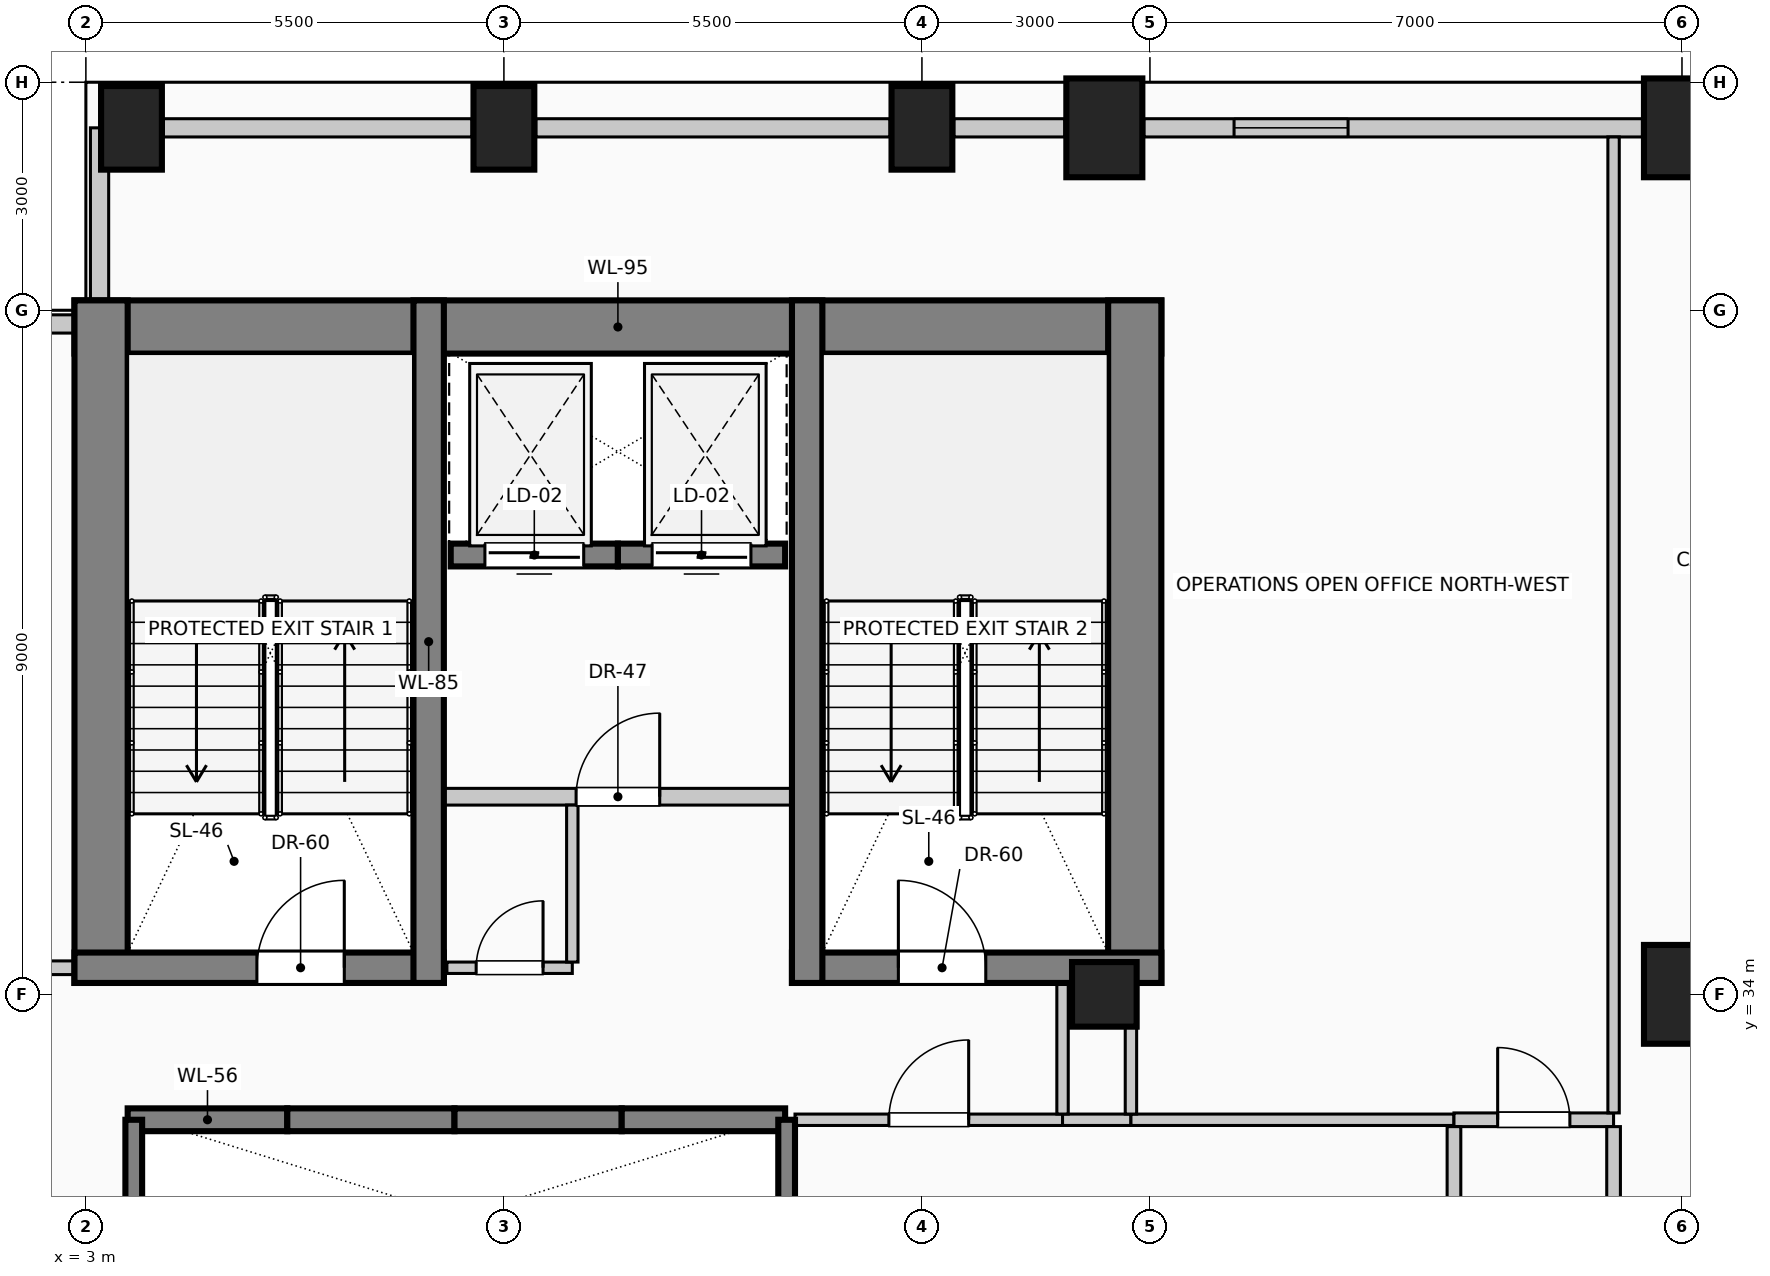
"""IFC4 building model, lengths in metres.
Left out: names, types, materials, properties, quantities, classifications, styles, units other than length and angle.
Written with IfcOpenShell. Run it as: python <this file> out.ifc"""

import sys

from ifc_helpers import new_model, si_unit, direction, frame, frame_2d, origin, origin_2d, place, context, subcontext, project, spatial, rectangle, circle, extrude, element, fill, save


model = new_model("IFC4")
c1 = context("Model", 3, precision=1e-05, world=origin(), true_north=direction((0.0, 1.0)))
c2 = subcontext(c1, "Body", "Model", "MODEL_VIEW")
j1 = project(units=[si_unit("LENGTHUNIT", "METRE"), si_unit("PLANEANGLEUNIT", "RADIAN")], contexts=[c1])
p1 = place(None, origin())
s1 = spatial("IfcSite", under=j1, at=p1, CompositionType="ELEMENT")
p2 = place(p1, origin())
s2 = spatial("IfcBuilding", under=s1, at=p2, CompositionType="ELEMENT")
p3 = place(p2, frame((0.0, 0.0, 218.6)))
s3 = spatial("IfcBuildingStorey", under=s2, at=p3, CompositionType="ELEMENT", Elevation=218.6)
p4 = place(p3, frame((2.85, 42.78, 0.0), z_axis=(0.0, 0.0, 1.0), x_axis=(1.0, 0.0, 0.0)))
e1 = element("IfcWall", 1, at=p4, inside=s3, PredefinedType="SHEAR", context=c2, shape_type="SweptSolid", body=[
    extrude(rectangle(XDim=14.3, YDim=0.7, at=frame_2d((7.15, 0.0))), origin(), (0.0, 0.0, 1.0), 4.0),
])
for number, where, z_axis, x_axis in (
    (2, (3.2, 34.15, 0.0), (0.0, 0.0, 1.0), (0.0, 1.0, 0.0)),
    (3, (16.8, 34.15, 0.0), (0.0, 0.0, 1.0), (0.0, 1.0, 0.0)),
):
    element("IfcWall", number, at=place(p3, frame(where, z_axis=z_axis, x_axis=x_axis)), inside=s3, PredefinedType="SHEAR", context=c2, shape_type="SweptSolid", body=[
        extrude(rectangle(XDim=8.98, YDim=0.7, at=frame_2d((4.49, 0.0))), origin(), (0.0, 0.0, 1.0), 4.0),
    ])
p5 = place(p3, frame((2.85, 34.35, 0.0), z_axis=(0.0, 0.0, 1.0), x_axis=(1.0, 0.0, 0.0)))
e4 = element("IfcWall", 4, at=p5, inside=s3, PredefinedType="SHEAR", context=c2, shape_type="SweptSolid", body=[
    extrude(rectangle(XDim=4.86, YDim=0.4, at=frame_2d((2.43, 0.0))), origin(), (0.0, 0.0, 1.0), 4.0),
])
p6 = place(p5, frame((2.4, 0.0, 0.0)))
e5 = element("IfcOpeningElement", 5, at=p6, cuts=e4, PredefinedType="OPENING", context=c2, shape_type="SweptSolid", body=[
    extrude(rectangle(XDim=1.15, YDim=2.2, at=frame_2d((0.575, 1.1))), frame((0.0, 0.21, 0.0), z_axis=(0.0, -1.0, 0.0), x_axis=(1.0, 0.0, 0.0)), (0.0, 0.0, 1.0), 0.42),
])
p7 = place(p3, frame((12.29, 34.35, 0.0), z_axis=(0.0, 0.0, 1.0), x_axis=(1.0, 0.0, 0.0)))
e6 = element("IfcWall", 6, at=p7, inside=s3, PredefinedType="SHEAR", context=c2, shape_type="SweptSolid", body=[
    extrude(rectangle(XDim=4.86, YDim=0.4, at=frame_2d((2.43, 0.0))), origin(), (0.0, 0.0, 1.0), 4.0),
])
p8 = place(p7, frame((1.4, 0.0, 0.0)))
e7 = element("IfcOpeningElement", 7, at=p8, cuts=e6, PredefinedType="OPENING", context=c2, shape_type="SweptSolid", body=[
    extrude(rectangle(XDim=1.15, YDim=2.2, at=frame_2d((0.575, 1.1))), frame((0.0, 0.21, 0.0), z_axis=(0.0, -1.0, 0.0), x_axis=(1.0, 0.0, 0.0)), (0.0, 0.0, 1.0), 0.42),
])
for number, where, z_axis, x_axis in (
    (8, (7.51, 34.15, 0.0), (0.0, 0.0, 1.0), (0.0, 1.0, 0.0)),
    (9, (12.49, 34.15, 0.0), (0.0, 0.0, 1.0), (0.0, 1.0, 0.0)),
):
    element("IfcWall", number, at=place(p3, frame(where, z_axis=z_axis, x_axis=x_axis)), inside=s3, PredefinedType="SHEAR", context=c2, shape_type="SweptSolid", body=[
        extrude(rectangle(XDim=8.98, YDim=0.4, at=frame_2d((4.49, 0.0))), origin(), (0.0, 0.0, 1.0), 4.0),
    ])
for number, where, z_axis, x_axis in (
    (10, (3.6, 45.4, 0.0), (0.0, 0.0, 1.0), (1.0, 0.0, 0.0)),
    (11, (8.5, 45.4, 0.0), (0.0, 0.0, 1.0), (1.0, 0.0, 0.0)),
    (12, (14.0, 45.4, 0.0), (0.0, 0.0, 1.0), (1.0, 0.0, 0.0)),
):
    element("IfcColumn", number, at=place(p3, frame(where, z_axis=z_axis, x_axis=x_axis)), inside=s3, PredefinedType="COLUMN", context=c2, shape_type="SweptSolid", body=[
        extrude(rectangle(XDim=0.8, YDim=1.1, at=origin_2d()), origin(), (0.0, 0.0, 1.0), 4.0),
    ])
for number, where, z_axis, x_axis in (
    (13, (16.4, 45.4, 0.0), (0.0, 0.0, 1.0), (1.0, 0.0, 0.0)),
    (14, (24.0, 45.4, 0.0), (0.0, 0.0, 1.0), (1.0, 0.0, 0.0)),
    (15, (24.0, 34.0, 0.0), (0.0, 0.0, 1.0), (1.0, 0.0, 0.0)),
):
    element("IfcColumn", number, at=place(p3, frame(where, z_axis=z_axis, x_axis=x_axis)), inside=s3, PredefinedType="COLUMN", context=c2, shape_type="SweptSolid", body=[
        extrude(rectangle(XDim=1.0, YDim=1.3, at=origin_2d()), origin(), (0.0, 0.0, 1.0), 4.0),
    ])
p9 = place(p3, frame((16.4, 34.0, 0.0), z_axis=(0.0, 0.0, 1.0), x_axis=(1.0, 0.0, 0.0)))
e16 = element("IfcColumn", 16, at=p9, inside=s3, PredefinedType="COLUMN", context=c2, shape_type="SweptSolid", body=[
    extrude(circle(Radius=0.425, at=origin_2d()), origin(), (0.0, 0.0, 1.0), 4.0),
])
p10 = place(p3, frame((4.02, 45.4, 0.0), z_axis=(0.0, 0.0, 1.0), x_axis=(1.0, 0.0, 0.0)))
e17 = element("IfcWall", 17, at=p10, inside=s3, PredefinedType="SOLIDWALL", context=c2, shape_type="SweptSolid", body=[
    extrude(rectangle(XDim=4.06, YDim=0.24, at=frame_2d((2.03, 0.0))), origin(), (0.0, 0.0, 1.0), 3.0),
])
p11 = place(p3, frame((8.92, 45.4, 0.0), z_axis=(0.0, 0.0, 1.0), x_axis=(1.0, 0.0, 0.0)))
e18 = element("IfcWall", 18, at=p11, inside=s3, PredefinedType="SOLIDWALL", context=c2, shape_type="SweptSolid", body=[
    extrude(rectangle(XDim=4.66, YDim=0.24, at=frame_2d((2.33, 0.0))), origin(), (0.0, 0.0, 1.0), 3.0),
])
p12 = place(p3, frame((14.42, 45.4, 0.0), z_axis=(0.0, 0.0, 1.0), x_axis=(1.0, 0.0, 0.0)))
e19 = element("IfcWall", 19, at=p12, inside=s3, PredefinedType="SOLIDWALL", context=c2, shape_type="SweptSolid", body=[
    extrude(rectangle(XDim=1.46, YDim=0.24, at=frame_2d((0.73, 0.0))), origin(), (0.0, 0.0, 1.0), 3.0),
])
p13 = place(p3, frame((16.92, 45.4, 0.0), z_axis=(0.0, 0.0, 1.0), x_axis=(1.0, 0.0, 0.0)))
e20 = element("IfcWall", 20, at=p13, inside=s3, PredefinedType="SOLIDWALL", context=c2, shape_type="SweptSolid", body=[
    extrude(rectangle(XDim=6.56, YDim=0.24, at=frame_2d((3.28, 0.0))), origin(), (0.0, 0.0, 1.0), 3.0),
])
p14 = place(p13, frame((1.187, 0.0, 0.42)))
e21 = element("IfcOpeningElement", 21, at=p14, cuts=e20, PredefinedType="OPENING", context=c2, shape_type="SweptSolid", body=[
    extrude(rectangle(XDim=1.5, YDim=2.2, at=frame_2d((0.75, 1.1))), frame((0.0, 0.13, 0.0), z_axis=(0.0, -1.0, 0.0), x_axis=(1.0, 0.0, 0.0)), (0.0, 0.0, 1.0), 0.26),
])
p15 = place(p3, frame((0.6, 42.82, 0.0), z_axis=(0.0, 0.0, 1.0), x_axis=(1.0, 0.0, 0.0)))
e22 = element("IfcWall", 22, at=p15, inside=s3, PredefinedType="SOLIDWALL", context=c2, shape_type="SweptSolid", body=[
    extrude(rectangle(XDim=2.245, YDim=0.24, at=frame_2d((1.123, 0.0))), origin(), (0.0, 0.0, 1.0), 3.75),
])
p16 = place(p3, frame((3.18, 43.135, 0.0), z_axis=(0.0, 0.0, 1.0), x_axis=(0.0, 1.0, 0.0)))
e23 = element("IfcWall", 23, at=p16, inside=s3, PredefinedType="SOLIDWALL", context=c2, shape_type="SweptSolid", body=[
    extrude(rectangle(XDim=2.265, YDim=0.24, at=frame_2d((1.132, 0.0))), origin(), (0.0, 0.0, 1.0), 3.75),
])
p17 = place(p3, frame((3.55, 32.35, 0.0), z_axis=(0.0, 0.0, 1.0), x_axis=(1.0, 0.0, 0.0)))
e24 = element("IfcWall", 24, at=p17, inside=s3, PredefinedType="SOLIDWALL", context=c2, shape_type="SweptSolid", body=[
    extrude(rectangle(XDim=2.1, YDim=0.3, at=frame_2d((1.05, 0.0))), origin(), (0.0, 0.0, 1.0), 4.0),
])
p18 = place(p3, frame((5.65, 32.35, 0.0), z_axis=(0.0, 0.0, 1.0), x_axis=(1.0, 0.0, 0.0)))
e25 = element("IfcWall", 25, at=p18, inside=s3, PredefinedType="SOLIDWALL", context=c2, shape_type="SweptSolid", body=[
    extrude(rectangle(XDim=2.2, YDim=0.3, at=frame_2d((1.1, 0.0))), origin(), (0.0, 0.0, 1.0), 4.0),
])
p19 = place(p3, frame((7.85, 32.35, 0.0), z_axis=(0.0, 0.0, 1.0), x_axis=(1.0, 0.0, 0.0)))
e26 = element("IfcWall", 26, at=p19, inside=s3, PredefinedType="SOLIDWALL", context=c2, shape_type="SweptSolid", body=[
    extrude(rectangle(XDim=2.2, YDim=0.3, at=frame_2d((1.1, 0.0))), origin(), (0.0, 0.0, 1.0), 4.0),
])
p20 = place(p3, frame((10.05, 32.35, 0.0), z_axis=(0.0, 0.0, 1.0), x_axis=(1.0, 0.0, 0.0)))
e27 = element("IfcWall", 27, at=p20, inside=s3, PredefinedType="SOLIDWALL", context=c2, shape_type="SweptSolid", body=[
    extrude(rectangle(XDim=2.15, YDim=0.3, at=frame_2d((1.075, 0.0))), origin(), (0.0, 0.0, 1.0), 4.0),
])
p21 = place(p3, frame((10.0, 39.78, 0.0), z_axis=(0.0, 0.0, 1.0), x_axis=(-1.0, 0.0, 0.0)))
e28 = element("IfcWall", 28, at=p21, inside=s3, PredefinedType="SOLIDWALL", context=c2, shape_type="SweptSolid", body=[
    extrude(rectangle(XDim=2.2, YDim=0.3, at=frame_2d((1.1, 0.0))), origin(), (0.0, 0.0, 1.0), 4.0),
])
p22 = place(p21, frame((0.45, 0.0, 0.0)))
e29 = element("IfcOpeningElement", 29, at=p22, cuts=e28, PredefinedType="OPENING", context=c2, shape_type="SweptSolid", body=[
    extrude(rectangle(XDim=1.3, YDim=2.25, at=frame_2d((0.65, 1.125))), frame((0.0, 0.16, 0.0), z_axis=(0.0, -1.0, 0.0), x_axis=(1.0, 0.0, 0.0)), (0.0, 0.0, 1.0), 0.32),
])
p23 = place(p3, frame((12.2, 39.78, 0.0), z_axis=(0.0, 0.0, 1.0), x_axis=(-1.0, 0.0, 0.0)))
e30 = element("IfcWall", 30, at=p23, inside=s3, PredefinedType="SOLIDWALL", context=c2, shape_type="SweptSolid", body=[
    extrude(rectangle(XDim=2.2, YDim=0.3, at=frame_2d((1.1, 0.0))), origin(), (0.0, 0.0, 1.0), 4.0),
])
p24 = place(p23, frame((0.45, 0.0, 0.0)))
e31 = element("IfcOpeningElement", 31, at=p24, cuts=e30, PredefinedType="OPENING", context=c2, shape_type="SweptSolid", body=[
    extrude(rectangle(XDim=1.3, YDim=2.25, at=frame_2d((0.65, 1.125))), frame((0.0, 0.16, 0.0), z_axis=(0.0, -1.0, 0.0), x_axis=(1.0, 0.0, 0.0)), (0.0, 0.0, 1.0), 0.32),
])
p25 = place(p3, frame((3.63, 26.8, 0.0), z_axis=(0.0, 0.0, 1.0), x_axis=(0.0, 1.0, 0.0)))
e32 = element("IfcWall", 32, at=p25, inside=s3, PredefinedType="SOLIDWALL", context=c2, shape_type="SweptSolid", body=[
    extrude(rectangle(XDim=5.55, YDim=0.22, at=frame_2d((2.775, 0.0))), origin(), (0.0, 0.0, 1.0), 4.0),
])
p26 = place(p3, frame((12.22, 29.75, 0.0), z_axis=(0.0, 0.0, 1.0), x_axis=(0.0, 1.0, 0.0)))
e33 = element("IfcWall", 33, at=p26, inside=s3, PredefinedType="SOLIDWALL", context=c2, shape_type="SweptSolid", body=[
    extrude(rectangle(XDim=2.6, YDim=0.22, at=frame_2d((1.3, 0.0))), origin(), (0.0, 0.0, 1.0), 4.0),
])
p27 = place(p3, frame((7.51, 36.6, 0.0), z_axis=(0.0, 0.0, 1.0), x_axis=(1.0, 0.0, 0.0)))
e34 = element("IfcWall", 34, at=p27, inside=s3, PredefinedType="PARTITIONING", context=c2, shape_type="SweptSolid", body=[
    extrude(rectangle(XDim=4.98, YDim=0.22, at=frame_2d((2.49, 0.0))), origin(), (0.0, 0.0, 1.0), 3.75),
])
p28 = place(p27, frame((1.94, 0.0, 0.0)))
e35 = element("IfcOpeningElement", 35, at=p28, cuts=e34, PredefinedType="OPENING", context=c2, shape_type="SweptSolid", body=[
    extrude(rectangle(XDim=1.1, YDim=2.2, at=frame_2d((0.55, 1.1))), frame((0.0, 0.12, 0.0), z_axis=(0.0, -1.0, 0.0), x_axis=(1.0, 0.0, 0.0)), (0.0, 0.0, 1.0), 0.24),
])
p29 = place(p3, frame((12.33, 32.35, 0.0), z_axis=(0.0, 0.0, 1.0), x_axis=(1.0, 0.0, 0.0)))
e36 = element("IfcWall", 36, at=p29, inside=s3, PredefinedType="PARTITIONING", context=c2, shape_type="SweptSolid", body=[
    extrude(rectangle(XDim=3.52, YDim=0.15, at=frame_2d((1.76, 0.0))), origin(), (0.0, 0.0, 1.0), 3.75),
])
p30 = place(p29, frame((1.235, 0.0, 0.0)))
e37 = element("IfcOpeningElement", 37, at=p30, cuts=e36, PredefinedType="OPENING", context=c2, shape_type="SweptSolid", body=[
    extrude(rectangle(XDim=1.05, YDim=2.15, at=frame_2d((0.525, 1.075))), frame((0.0, 0.085, 0.0), z_axis=(0.0, -1.0, 0.0), x_axis=(1.0, 0.0, 0.0)), (0.0, 0.0, 1.0), 0.17),
])
p31 = place(p3, frame((15.85, 32.35, 0.0), z_axis=(0.0, 0.0, 1.0), x_axis=(1.0, 0.0, 0.0)))
e38 = element("IfcWall", 38, at=p31, inside=s3, PredefinedType="PARTITIONING", context=c2, shape_type="SweptSolid", body=[
    extrude(rectangle(XDim=0.9, YDim=0.15, at=frame_2d((0.45, 0.0))), origin(), (0.0, 0.0, 1.0), 3.75),
])
p32 = place(p3, frame((16.75, 32.35, 0.0), z_axis=(0.0, 0.0, 1.0), x_axis=(1.0, 0.0, 0.0)))
e39 = element("IfcWall", 39, at=p32, inside=s3, PredefinedType="PARTITIONING", context=c2, shape_type="SweptSolid", body=[
    extrude(rectangle(XDim=4.25, YDim=0.15, at=frame_2d((2.125, 0.0))), origin(), (0.0, 0.0, 1.0), 3.75),
])
p33 = place(p3, frame((21.0, 32.35, 0.0), z_axis=(0.0, 0.0, 1.0), x_axis=(1.0, 0.0, 0.0)))
e40 = element("IfcWall", 40, at=p33, inside=s3, PredefinedType="PARTITIONING", context=c2, shape_type="SweptSolid", body=[
    extrude(rectangle(XDim=2.1, YDim=0.18, at=frame_2d((1.05, 0.0))), origin(), (0.0, 0.0, 1.0), 3.75),
])
p34 = place(p33, frame((0.575, 0.0, 0.0)))
e41 = element("IfcOpeningElement", 41, at=p34, cuts=e40, PredefinedType="OPENING", context=c2, shape_type="SweptSolid", body=[
    extrude(rectangle(XDim=0.95, YDim=2.15, at=frame_2d((0.475, 1.075))), frame((0.0, 0.1, 0.0), z_axis=(0.0, -1.0, 0.0), x_axis=(1.0, 0.0, 0.0)), (0.0, 0.0, 1.0), 0.2),
])
p35 = place(p3, frame((1.15, 34.35, 0.0), z_axis=(0.0, 0.0, 1.0), x_axis=(1.0, 0.0, 0.0)))
e42 = element("IfcWall", 42, at=p35, inside=s3, PredefinedType="PARTITIONING", context=c2, shape_type="SweptSolid", body=[
    extrude(rectangle(XDim=1.7, YDim=0.18, at=frame_2d((0.85, 0.0))), origin(), (0.0, 0.0, 1.0), 3.75),
])
p36 = place(p3, frame((7.75, 34.35, 0.0), z_axis=(0.0, 0.0, 1.0), x_axis=(1.0, 0.0, 0.0)))
e43 = element("IfcWall", 43, at=p36, inside=s3, PredefinedType="PARTITIONING", context=c2, shape_type="SweptSolid", body=[
    extrude(rectangle(XDim=1.65, YDim=0.15, at=frame_2d((0.825, 0.0))), origin(), (0.0, 0.0, 1.0), 3.75),
])
p37 = place(p36, frame((0.385, 0.0, 0.0)))
e44 = element("IfcOpeningElement", 44, at=p37, cuts=e43, PredefinedType="OPENING", context=c2, shape_type="SweptSolid", body=[
    extrude(rectangle(XDim=0.88, YDim=2.1, at=frame_2d((0.44, 1.05))), frame((0.0, 0.085, 0.0), z_axis=(0.0, -1.0, 0.0), x_axis=(1.0, 0.0, 0.0)), (0.0, 0.0, 1.0), 0.17),
])
p38 = place(p3, frame((9.4, 34.425, 0.0), z_axis=(0.0, 0.0, 1.0), x_axis=(0.0, 1.0, 0.0)))
e45 = element("IfcWall", 45, at=p38, inside=s3, PredefinedType="PARTITIONING", context=c2, shape_type="SweptSolid", body=[
    extrude(rectangle(XDim=2.065, YDim=0.15, at=frame_2d((1.032, 0.0))), origin(), (0.0, 0.0, 1.0), 3.75),
])
p39 = place(p3, frame((15.85, 32.425, 0.0), z_axis=(0.0, 0.0, 1.0), x_axis=(0.0, 1.0, 0.0)))
e46 = element("IfcWall", 46, at=p39, inside=s3, PredefinedType="PARTITIONING", context=c2, shape_type="SweptSolid", body=[
    extrude(rectangle(XDim=1.725, YDim=0.15, at=frame_2d((0.862, 0.0))), origin(), (0.0, 0.0, 1.0), 3.75),
])
p40 = place(p3, frame((16.75, 32.425, 0.0), z_axis=(0.0, 0.0, 1.0), x_axis=(0.0, 1.0, 0.0)))
e47 = element("IfcWall", 47, at=p40, inside=s3, PredefinedType="PARTITIONING", context=c2, shape_type="SweptSolid", body=[
    extrude(rectangle(XDim=1.15, YDim=0.15, at=frame_2d((0.575, 0.0))), origin(), (0.0, 0.0, 1.0), 3.75),
])
p41 = place(p3, frame((21.0, 29.925, 0.0), z_axis=(0.0, 0.0, 1.0), x_axis=(0.0, 1.0, 0.0)))
e48 = element("IfcWall", 48, at=p41, inside=s3, PredefinedType="PARTITIONING", context=c2, shape_type="SweptSolid", body=[
    extrude(rectangle(XDim=2.335, YDim=0.18, at=frame_2d((1.167, 0.0))), origin(), (0.0, 0.0, 1.0), 3.75),
])
p42 = place(p3, frame((23.1, 29.14, 0.0), z_axis=(0.0, 0.0, 1.0), x_axis=(0.0, 1.0, 0.0)))
e49 = element("IfcWall", 49, at=p42, inside=s3, PredefinedType="PARTITIONING", context=c2, shape_type="SweptSolid", body=[
    extrude(rectangle(XDim=3.12, YDim=0.18, at=frame_2d((1.56, 0.0))), origin(), (0.0, 0.0, 1.0), 3.75),
])
p43 = place(p3, frame((23.1, 32.44, 0.0), z_axis=(0.0, 0.0, 1.0), x_axis=(0.0, 1.0, 0.0)))
e50 = element("IfcWall", 50, at=p43, inside=s3, PredefinedType="PARTITIONING", context=c2, shape_type="SweptSolid", body=[
    extrude(rectangle(XDim=12.84, YDim=0.15, at=frame_2d((6.42, 0.0))), origin(), (0.0, 0.0, 1.0), 3.75),
])
p44 = place(p14, origin())
e51 = element("IfcWindow", 51, at=p44, inside=s3, PartitioningType="SINGLE_PANEL", PredefinedType="WINDOW", context=c2, shape_type="SweptSolid", body=[
    extrude(rectangle(XDim=1.5, YDim=2.2, at=frame_2d((0.75, 1.1))), frame((0.0, 0.03, 0.0), z_axis=(0.0, -1.0, 0.0), x_axis=(1.0, 0.0, 0.0)), (0.0, 0.0, 1.0), 0.06),
])
fill(e21, e51)
p45 = place(p22, origin())
e52 = element("IfcDoor", 52, at=p45, inside=s3, OperationType="SLIDING_TO_LEFT", PredefinedType="DOOR", context=c2, shape_type="SweptSolid", body=[
    extrude(rectangle(XDim=1.3, YDim=2.25, at=frame_2d((0.65, 1.125))), frame((0.0, 0.025, 0.0), z_axis=(0.0, -1.0, 0.0), x_axis=(1.0, 0.0, 0.0)), (0.0, 0.0, 1.0), 0.05),
])
fill(e29, e52)
p46 = place(p24, origin())
e53 = element("IfcDoor", 53, at=p46, inside=s3, OperationType="SLIDING_TO_RIGHT", PredefinedType="DOOR", context=c2, shape_type="SweptSolid", body=[
    extrude(rectangle(XDim=1.3, YDim=2.25, at=frame_2d((0.65, 1.125))), frame((0.0, 0.025, 0.0), z_axis=(0.0, -1.0, 0.0), x_axis=(1.0, 0.0, 0.0)), (0.0, 0.0, 1.0), 0.05),
])
fill(e31, e53)
p47 = place(p6, origin())
e54 = element("IfcDoor", 54, at=p47, inside=s3, OperationType="SINGLE_SWING_RIGHT", PredefinedType="DOOR", context=c2, shape_type="SweptSolid", body=[
    extrude(rectangle(XDim=1.15, YDim=2.2, at=frame_2d((0.575, 1.1))), frame((0.0, 0.025, 0.0), z_axis=(0.0, -1.0, 0.0), x_axis=(1.0, 0.0, 0.0)), (0.0, 0.0, 1.0), 0.05),
])
fill(e5, e54)
p48 = place(p8, origin())
e55 = element("IfcDoor", 55, at=p48, inside=s3, OperationType="SINGLE_SWING_LEFT", PredefinedType="DOOR", context=c2, shape_type="SweptSolid", body=[
    extrude(rectangle(XDim=1.15, YDim=2.2, at=frame_2d((0.575, 1.1))), frame((0.0, 0.025, 0.0), z_axis=(0.0, -1.0, 0.0), x_axis=(1.0, 0.0, 0.0)), (0.0, 0.0, 1.0), 0.05),
])
fill(e7, e55)
p49 = place(p28, origin())
e56 = element("IfcDoor", 56, at=p49, inside=s3, OperationType="SINGLE_SWING_RIGHT", PredefinedType="DOOR", context=c2, shape_type="SweptSolid", body=[
    extrude(rectangle(XDim=1.1, YDim=2.2, at=frame_2d((0.55, 1.1))), frame((0.0, 0.025, 0.0), z_axis=(0.0, -1.0, 0.0), x_axis=(1.0, 0.0, 0.0)), (0.0, 0.0, 1.0), 0.05),
])
fill(e35, e56)
p50 = place(p30, origin())
e57 = element("IfcDoor", 57, at=p50, inside=s3, OperationType="SINGLE_SWING_RIGHT", PredefinedType="DOOR", context=c2, shape_type="SweptSolid", body=[
    extrude(rectangle(XDim=1.05, YDim=2.15, at=frame_2d((0.525, 1.075))), frame((0.0, 0.025, 0.0), z_axis=(0.0, -1.0, 0.0), x_axis=(1.0, 0.0, 0.0)), (0.0, 0.0, 1.0), 0.05),
])
fill(e37, e57)
p51 = place(p34, origin())
e58 = element("IfcDoor", 58, at=p51, inside=s3, OperationType="SINGLE_SWING_LEFT", PredefinedType="DOOR", context=c2, shape_type="SweptSolid", body=[
    extrude(rectangle(XDim=0.95, YDim=2.15, at=frame_2d((0.475, 1.075))), frame((0.0, 0.025, 0.0), z_axis=(0.0, -1.0, 0.0), x_axis=(1.0, 0.0, 0.0)), (0.0, 0.0, 1.0), 0.05),
])
fill(e41, e58)
p52 = place(p37, origin())
e59 = element("IfcDoor", 59, at=p52, inside=s3, OperationType="SINGLE_SWING_RIGHT", PredefinedType="DOOR", context=c2, shape_type="SweptSolid", body=[
    extrude(rectangle(XDim=0.88, YDim=2.1, at=frame_2d((0.44, 1.05))), frame((0.0, 0.025, 0.0), z_axis=(0.0, -1.0, 0.0), x_axis=(1.0, 0.0, 0.0)), (0.0, 0.0, 1.0), 0.05),
])
fill(e44, e59)
save(model, sys.argv[1])
